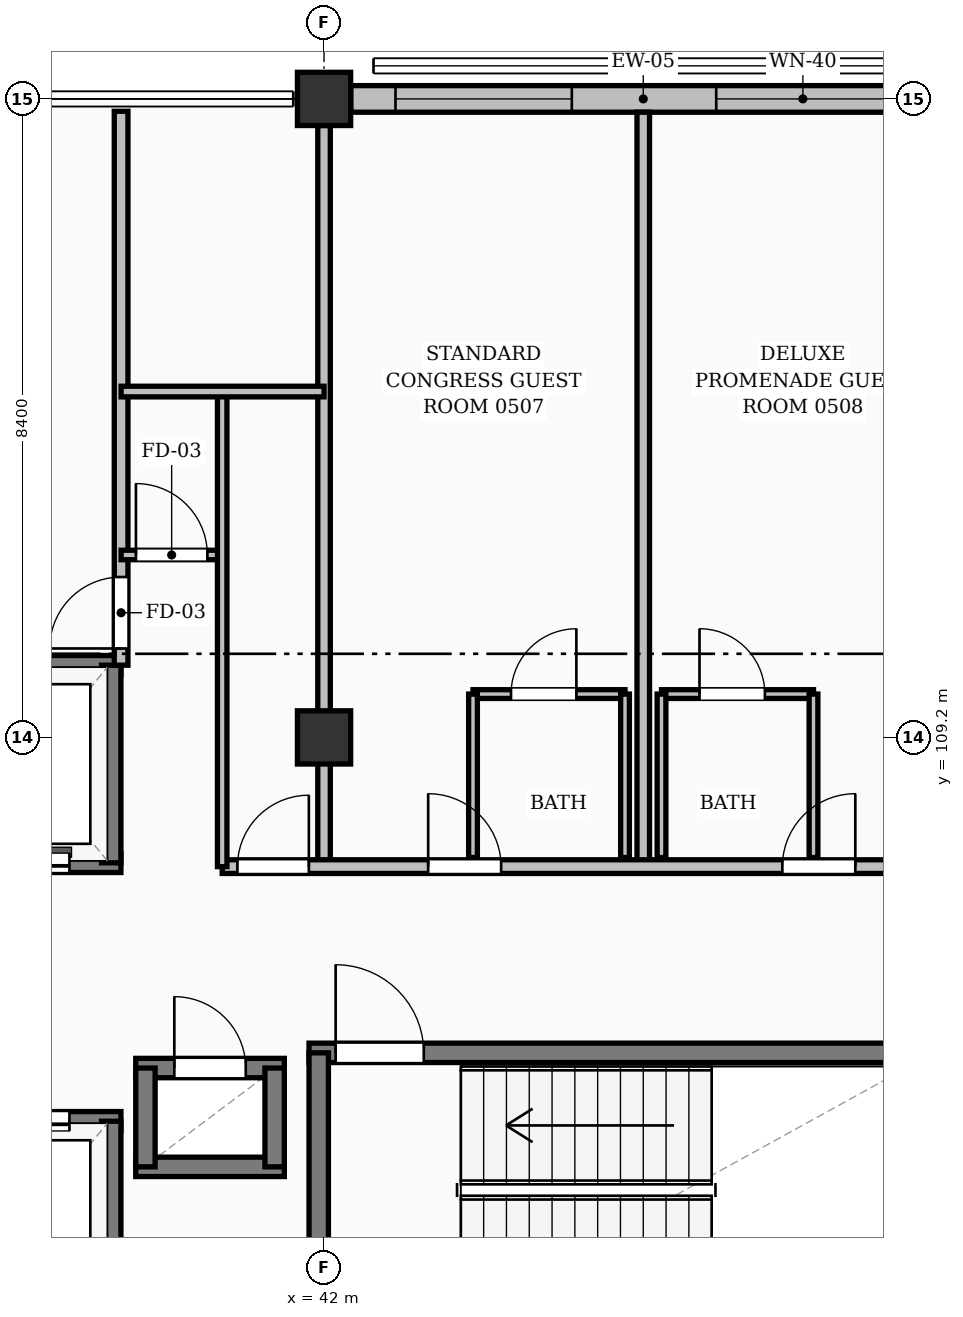
"""IFC4 building model, lengths in metres.
Left out: names, types, materials, properties, quantities, classifications, styles, units other than length and angle.
Written with IfcOpenShell. Run it as: python <this file> out.ifc"""

import sys

from ifc_helpers import new_model, si_unit, direction, frame, frame_2d, origin, origin_2d, place, context, subcontext, project, spatial, rectangle, extrude, element, fill, save


model = new_model("IFC4")
c1 = context("Model", 3, precision=1e-05, world=origin(), true_north=direction((0.0, 1.0)))
c2 = subcontext(c1, "Body", "Model", "MODEL_VIEW")
j1 = project(units=[si_unit("LENGTHUNIT", "METRE"), si_unit("PLANEANGLEUNIT", "RADIAN")], contexts=[c1])
p1 = place(None, origin())
s1 = spatial("IfcSite", under=j1, at=p1, CompositionType="ELEMENT")
p2 = place(p1, origin())
s2 = spatial("IfcBuilding", under=s1, at=p2, CompositionType="ELEMENT")
p3 = place(p2, frame((0.0, 0.0, 18.48)))
s3 = spatial("IfcBuildingStorey", under=s2, at=p3, CompositionType="ELEMENT", Elevation=18.48)
for number, where, z_axis, x_axis in (
    (1, (42.0, 109.2, 0.0), (0.0, 0.0, 1.0), (1.0, 0.0, 0.0)),
    (2, (42.0, 117.6, 0.0), (0.0, 0.0, 1.0), (1.0, 0.0, 0.0)),
):
    element("IfcColumn", number, at=place(p3, frame(where, z_axis=z_axis, x_axis=x_axis)), inside=s3, PredefinedType="COLUMN", context=c2, shape_type="SweptSolid", body=[
        extrude(rectangle(XDim=0.7, YDim=0.7, at=origin_2d()), origin(), (0.0, 0.0, 1.0), 3.36),
    ])
p4 = place(p3, frame((42.351, 117.6, 0.0), z_axis=(0.0, 0.0, 1.0), x_axis=(1.0, 0.0, 0.0)))
e3 = element("IfcWall", 3, at=p4, inside=s3, PredefinedType="SOLIDWALL", context=c2, shape_type="SweptSolid", body=[
    extrude(rectangle(XDim=7.698, YDim=0.35, at=frame_2d((3.849, 0.0))), origin(), (0.0, 0.0, 1.0), 2.494),
])
p5 = place(p4, frame((0.589, 0.0, 0.25)))
e4 = element("IfcOpeningElement", 4, at=p5, cuts=e3, PredefinedType="OPENING", context=c2, shape_type="SweptSolid", body=[
    extrude(rectangle(XDim=2.32, YDim=1.9, at=frame_2d((1.16, 0.95))), frame((0.0, 0.185, 0.0), z_axis=(0.0, -1.0, 0.0), x_axis=(1.0, 0.0, 0.0)), (0.0, 0.0, 1.0), 0.37),
])
p6 = place(p4, frame((4.809, 0.0, 0.25)))
e5 = element("IfcOpeningElement", 5, at=p6, cuts=e3, PredefinedType="OPENING", context=c2, shape_type="SweptSolid", body=[
    extrude(rectangle(XDim=2.28, YDim=2.0, at=frame_2d((1.14, 1.0))), frame((0.0, 0.185, 0.0), z_axis=(0.0, -1.0, 0.0), x_axis=(1.0, 0.0, 0.0)), (0.0, 0.0, 1.0), 0.37),
])
p7 = place(p3, frame((41.802, 105.05, 0.0), z_axis=(0.0, 0.0, 1.0), x_axis=(1.0, 0.0, 0.0)))
e6 = element("IfcWall", 6, at=p7, inside=s3, PredefinedType="SOLIDWALL", context=c2, shape_type="SweptSolid", body=[
    extrude(rectangle(XDim=8.225, YDim=0.255, at=frame_2d((4.113, 0.0))), origin(), (0.0, 0.0, 1.0), 3.12),
])
p8 = place(p7, frame((0.35, 0.0, 0.0)))
e7 = element("IfcOpeningElement", 7, at=p8, cuts=e6, PredefinedType="OPENING", context=c2, shape_type="SweptSolid", body=[
    extrude(rectangle(XDim=1.16, YDim=2.15, at=frame_2d((0.58, 1.075))), frame((0.0, 0.137, 0.0), z_axis=(0.0, -1.0, 0.0), x_axis=(1.0, 0.0, 0.0)), (0.0, 0.0, 1.0), 0.275),
])
p9 = place(p3, frame((41.93, 101.42, 0.0), z_axis=(0.0, 0.0, 1.0), x_axis=(0.0, 1.0, 0.0)))
e8 = element("IfcWall", 8, at=p9, inside=s3, PredefinedType="SOLIDWALL", context=c2, shape_type="SweptSolid", body=[
    extrude(rectangle(XDim=3.63, YDim=0.255, at=frame_2d((1.815, 0.0))), origin(), (0.0, 0.0, 1.0), 3.12),
])
p10 = place(p3, frame((36.873, 107.55, 0.0), z_axis=(0.0, 0.0, 1.0), x_axis=(1.0, 0.0, 0.0)))
e9 = element("IfcWall", 9, at=p10, inside=s3, PredefinedType="SOLIDWALL", context=c2, shape_type="SweptSolid", body=[
    extrude(rectangle(XDim=2.455, YDim=0.255, at=frame_2d((1.228, 0.0))), origin(), (0.0, 0.0, 1.0), 3.12),
])
p11 = place(p10, frame((0.677, 0.0, 0.0)))
e10 = element("IfcOpeningElement", 10, at=p11, cuts=e9, PredefinedType="OPENING", context=c2, shape_type="SweptSolid", body=[
    extrude(rectangle(XDim=1.1, YDim=2.15, at=frame_2d((0.55, 1.075))), frame((0.0, 0.137, 0.0), z_axis=(0.0, -1.0, 0.0), x_axis=(1.0, 0.0, 0.0)), (0.0, 0.0, 1.0), 0.275),
])
p12 = place(p3, frame((36.873, 110.15, 0.0), z_axis=(0.0, 0.0, 1.0), x_axis=(1.0, 0.0, 0.0)))
e11 = element("IfcWall", 11, at=p12, inside=s3, PredefinedType="SOLIDWALL", context=c2, shape_type="SweptSolid", body=[
    extrude(rectangle(XDim=2.455, YDim=0.255, at=frame_2d((1.228, 0.0))), origin(), (0.0, 0.0, 1.0), 3.12),
])
p13 = place(p3, frame((39.2, 107.55, 0.0), z_axis=(0.0, 0.0, 1.0), x_axis=(0.0, 1.0, 0.0)))
e12 = element("IfcWall", 12, at=p13, inside=s3, PredefinedType="SOLIDWALL", context=c2, shape_type="SweptSolid", body=[
    extrude(rectangle(XDim=2.6, YDim=0.255, at=frame_2d((1.3, 0.0))), origin(), (0.0, 0.0, 1.0), 3.12),
])
p14 = place(p3, frame((36.873, 104.15, 0.0), z_axis=(0.0, 0.0, 1.0), x_axis=(1.0, 0.0, 0.0)))
e13 = element("IfcWall", 13, at=p14, inside=s3, PredefinedType="SOLIDWALL", context=c2, shape_type="SweptSolid", body=[
    extrude(rectangle(XDim=2.455, YDim=0.255, at=frame_2d((1.228, 0.0))), origin(), (0.0, 0.0, 1.0), 3.12),
])
p15 = place(p14, frame((0.677, 0.0, 0.0)))
e14 = element("IfcOpeningElement", 14, at=p15, cuts=e13, PredefinedType="OPENING", context=c2, shape_type="SweptSolid", body=[
    extrude(rectangle(XDim=1.1, YDim=2.15, at=frame_2d((0.55, 1.075))), frame((0.0, 0.137, 0.0), z_axis=(0.0, -1.0, 0.0), x_axis=(1.0, 0.0, 0.0)), (0.0, 0.0, 1.0), 0.275),
])
p16 = place(p3, frame((39.2, 101.55, 0.0), z_axis=(0.0, 0.0, 1.0), x_axis=(0.0, 1.0, 0.0)))
e15 = element("IfcWall", 15, at=p16, inside=s3, PredefinedType="SOLIDWALL", context=c2, shape_type="SweptSolid", body=[
    extrude(rectangle(XDim=2.6, YDim=0.255, at=frame_2d((1.3, 0.0))), origin(), (0.0, 0.0, 1.0), 3.12),
])
p17 = place(p3, frame((39.522, 103.55, 0.0), z_axis=(0.0, 0.0, 1.0), x_axis=(1.0, 0.0, 0.0)))
e16 = element("IfcWall", 16, at=p17, inside=s3, PredefinedType="SOLIDWALL", context=c2, shape_type="SweptSolid", body=[
    extrude(rectangle(XDim=1.955, YDim=0.255, at=frame_2d((0.978, 0.0))), origin(), (0.0, 0.0, 1.0), 3.12),
])
p18 = place(p3, frame((39.522, 104.85, 0.0), z_axis=(0.0, 0.0, 1.0), x_axis=(1.0, 0.0, 0.0)))
e17 = element("IfcWall", 17, at=p18, inside=s3, PredefinedType="SOLIDWALL", context=c2, shape_type="SweptSolid", body=[
    extrude(rectangle(XDim=1.955, YDim=0.255, at=frame_2d((0.978, 0.0))), origin(), (0.0, 0.0, 1.0), 3.12),
])
p19 = place(p18, frame((0.508, 0.0, 0.0)))
e18 = element("IfcOpeningElement", 18, at=p19, cuts=e17, PredefinedType="OPENING", context=c2, shape_type="SweptSolid", body=[
    extrude(rectangle(XDim=0.94, YDim=2.1, at=frame_2d((0.47, 1.05))), frame((0.0, 0.137, 0.0), z_axis=(0.0, -1.0, 0.0), x_axis=(1.0, 0.0, 0.0)), (0.0, 0.0, 1.0), 0.275),
])
for number, where, z_axis, x_axis in (
    (19, (39.65, 103.55, 0.0), (0.0, 0.0, 1.0), (0.0, 1.0, 0.0)),
    (20, (41.35, 103.55, 0.0), (0.0, 0.0, 1.0), (0.0, 1.0, 0.0)),
):
    element("IfcWall", number, at=place(p3, frame(where, z_axis=z_axis, x_axis=x_axis)), inside=s3, PredefinedType="SOLIDWALL", context=c2, shape_type="SweptSolid", body=[
        extrude(rectangle(XDim=1.3, YDim=0.255, at=frame_2d((0.65, 0.0))), origin(), (0.0, 0.0, 1.0), 3.12),
    ])
p20 = place(p3, frame((43.96, 109.77, 0.0), z_axis=(0.0, 0.0, 1.0), x_axis=(1.0, 0.0, 0.0)))
e21 = element("IfcWall", 21, at=p20, inside=s3, PredefinedType="PARTITIONING", context=c2, shape_type="SweptSolid", body=[
    extrude(rectangle(XDim=2.0, YDim=0.115, at=frame_2d((1.0, 0.0))), origin(), (0.0, 0.0, 1.0), 3.12),
])
p21 = place(p20, frame((0.5, 0.0, 0.0)))
e22 = element("IfcOpeningElement", 22, at=p21, cuts=e21, PredefinedType="OPENING", context=c2, shape_type="SweptSolid", body=[
    extrude(rectangle(XDim=0.86, YDim=2.05, at=frame_2d((0.43, 1.025))), frame((0.0, 0.067, 0.0), z_axis=(0.0, -1.0, 0.0), x_axis=(1.0, 0.0, 0.0)), (0.0, 0.0, 1.0), 0.135),
])
p22 = place(p3, frame((43.96, 107.62, 0.0), z_axis=(0.0, 0.0, 1.0), x_axis=(0.0, 1.0, 0.0)))
e23 = element("IfcWall", 23, at=p22, inside=s3, PredefinedType="PARTITIONING", context=c2, shape_type="SweptSolid", body=[
    extrude(rectangle(XDim=2.15, YDim=0.115, at=frame_2d((1.075, 0.0))), origin(), (0.0, 0.0, 1.0), 2.642),
])
p23 = place(p3, frame((45.96, 107.62, 0.0), z_axis=(0.0, 0.0, 1.0), x_axis=(0.0, 1.0, 0.0)))
e24 = element("IfcWall", 24, at=p23, inside=s3, PredefinedType="PARTITIONING", context=c2, shape_type="SweptSolid", body=[
    extrude(rectangle(XDim=2.15, YDim=0.115, at=frame_2d((1.075, 0.0))), origin(), (0.0, 0.0, 1.0), 3.12),
])
p24 = place(p3, frame((46.44, 109.77, 0.0), z_axis=(0.0, 0.0, 1.0), x_axis=(1.0, 0.0, 0.0)))
e25 = element("IfcWall", 25, at=p24, inside=s3, PredefinedType="PARTITIONING", context=c2, shape_type="SweptSolid", body=[
    extrude(rectangle(XDim=2.0, YDim=0.115, at=frame_2d((1.0, 0.0))), origin(), (0.0, 0.0, 1.0), 3.12),
])
p25 = place(p24, frame((0.5, 0.0, 0.0)))
e26 = element("IfcOpeningElement", 26, at=p25, cuts=e25, PredefinedType="OPENING", context=c2, shape_type="SweptSolid", body=[
    extrude(rectangle(XDim=0.86, YDim=2.05, at=frame_2d((0.43, 1.025))), frame((0.0, 0.067, 0.0), z_axis=(0.0, -1.0, 0.0), x_axis=(1.0, 0.0, 0.0)), (0.0, 0.0, 1.0), 0.135),
])
p26 = place(p3, frame((46.44, 107.62, 0.0), z_axis=(0.0, 0.0, 1.0), x_axis=(0.0, 1.0, 0.0)))
e27 = element("IfcWall", 27, at=p26, inside=s3, PredefinedType="PARTITIONING", context=c2, shape_type="SweptSolid", body=[
    extrude(rectangle(XDim=2.15, YDim=0.115, at=frame_2d((1.075, 0.0))), origin(), (0.0, 0.0, 1.0), 3.12),
])
p27 = place(p3, frame((48.44, 107.62, 0.0), z_axis=(0.0, 0.0, 1.0), x_axis=(0.0, 1.0, 0.0)))
e28 = element("IfcWall", 28, at=p27, inside=s3, PredefinedType="PARTITIONING", context=c2, shape_type="SweptSolid", body=[
    extrude(rectangle(XDim=2.15, YDim=0.115, at=frame_2d((1.075, 0.0))), origin(), (0.0, 0.0, 1.0), 2.642),
])
p28 = place(p3, frame((46.2, 107.5, 0.0), z_axis=(0.0, 0.0, 1.0), x_axis=(0.0, 1.0, 0.0)))
e29 = element("IfcWall", 29, at=p28, inside=s3, PredefinedType="PARTITIONING", context=c2, shape_type="SweptSolid", body=[
    extrude(rectangle(XDim=9.925, YDim=0.165, at=frame_2d((4.962, 0.0))), origin(), (0.0, 0.0, 1.0), 3.12),
])
p29 = place(p3, frame((42.0, 107.5, 0.0), z_axis=(0.0, 0.0, 1.0), x_axis=(0.0, 1.0, 0.0)))
e30 = element("IfcWall", 30, at=p29, inside=s3, PredefinedType="PARTITIONING", context=c2, shape_type="SweptSolid", body=[
    extrude(rectangle(XDim=9.75, YDim=0.165, at=frame_2d((4.875, 0.0))), origin(), (0.0, 0.0, 1.0), 2.455),
])
p30 = place(p3, frame((40.66, 107.5, 0.0), z_axis=(0.0, 0.0, 1.0), x_axis=(1.0, 0.0, 0.0)))
e31 = element("IfcWall", 31, at=p30, inside=s3, PredefinedType="PARTITIONING", context=c2, shape_type="SweptSolid", body=[
    extrude(rectangle(XDim=43.21, YDim=0.18, at=frame_2d((21.605, 0.0))), origin(), (0.0, 0.0, 1.0), 3.12),
])
p31 = place(p30, frame((0.2, 0.0, 0.0)))
e32 = element("IfcOpeningElement", 32, at=p31, cuts=e31, PredefinedType="OPENING", context=c2, shape_type="SweptSolid", body=[
    extrude(rectangle(XDim=0.94, YDim=2.1, at=frame_2d((0.47, 1.05))), frame((0.0, 0.1, 0.0), z_axis=(0.0, -1.0, 0.0), x_axis=(1.0, 0.0, 0.0)), (0.0, 0.0, 1.0), 0.2),
])
p32 = place(p30, frame((2.71, 0.0, 0.0)))
e33 = element("IfcOpeningElement", 33, at=p32, cuts=e31, PredefinedType="OPENING", context=c2, shape_type="SweptSolid", body=[
    extrude(rectangle(XDim=0.96, YDim=2.15, at=frame_2d((0.48, 1.075))), frame((0.0, 0.1, 0.0), z_axis=(0.0, -1.0, 0.0), x_axis=(1.0, 0.0, 0.0)), (0.0, 0.0, 1.0), 0.2),
])
p33 = place(p30, frame((7.37, 0.0, 0.0)))
e34 = element("IfcOpeningElement", 34, at=p33, cuts=e31, PredefinedType="OPENING", context=c2, shape_type="SweptSolid", body=[
    extrude(rectangle(XDim=0.96, YDim=2.15, at=frame_2d((0.48, 1.075))), frame((0.0, 0.1, 0.0), z_axis=(0.0, -1.0, 0.0), x_axis=(1.0, 0.0, 0.0)), (0.0, 0.0, 1.0), 0.2),
])
p34 = place(p30, frame((11.11, 0.0, 0.0)))
e35 = element("IfcOpeningElement", 35, at=p34, cuts=e31, PredefinedType="OPENING", context=c2, shape_type="SweptSolid", body=[
    extrude(rectangle(XDim=0.96, YDim=2.15, at=frame_2d((0.48, 1.075))), frame((0.0, 0.1, 0.0), z_axis=(0.0, -1.0, 0.0), x_axis=(1.0, 0.0, 0.0)), (0.0, 0.0, 1.0), 0.2),
])
p35 = place(p30, frame((15.77, 0.0, 0.0)))
e36 = element("IfcOpeningElement", 36, at=p35, cuts=e31, PredefinedType="OPENING", context=c2, shape_type="SweptSolid", body=[
    extrude(rectangle(XDim=0.96, YDim=2.15, at=frame_2d((0.48, 1.075))), frame((0.0, 0.1, 0.0), z_axis=(0.0, -1.0, 0.0), x_axis=(1.0, 0.0, 0.0)), (0.0, 0.0, 1.0), 0.2),
])
p36 = place(p30, frame((19.51, 0.0, 0.0)))
e37 = element("IfcOpeningElement", 37, at=p36, cuts=e31, PredefinedType="OPENING", context=c2, shape_type="SweptSolid", body=[
    extrude(rectangle(XDim=0.96, YDim=2.15, at=frame_2d((0.48, 1.075))), frame((0.0, 0.1, 0.0), z_axis=(0.0, -1.0, 0.0), x_axis=(1.0, 0.0, 0.0)), (0.0, 0.0, 1.0), 0.2),
])
p37 = place(p30, frame((24.17, 0.0, 0.0)))
e38 = element("IfcOpeningElement", 38, at=p37, cuts=e31, PredefinedType="OPENING", context=c2, shape_type="SweptSolid", body=[
    extrude(rectangle(XDim=0.96, YDim=2.15, at=frame_2d((0.48, 1.075))), frame((0.0, 0.1, 0.0), z_axis=(0.0, -1.0, 0.0), x_axis=(1.0, 0.0, 0.0)), (0.0, 0.0, 1.0), 0.2),
])
p38 = place(p30, frame((27.91, 0.0, 0.0)))
e39 = element("IfcOpeningElement", 39, at=p38, cuts=e31, PredefinedType="OPENING", context=c2, shape_type="SweptSolid", body=[
    extrude(rectangle(XDim=0.96, YDim=2.15, at=frame_2d((0.48, 1.075))), frame((0.0, 0.1, 0.0), z_axis=(0.0, -1.0, 0.0), x_axis=(1.0, 0.0, 0.0)), (0.0, 0.0, 1.0), 0.2),
])
p39 = place(p30, frame((32.57, 0.0, 0.0)))
e40 = element("IfcOpeningElement", 40, at=p39, cuts=e31, PredefinedType="OPENING", context=c2, shape_type="SweptSolid", body=[
    extrude(rectangle(XDim=0.96, YDim=2.15, at=frame_2d((0.48, 1.075))), frame((0.0, 0.1, 0.0), z_axis=(0.0, -1.0, 0.0), x_axis=(1.0, 0.0, 0.0)), (0.0, 0.0, 1.0), 0.2),
])
p40 = place(p30, frame((36.44, 0.0, 0.0)))
e41 = element("IfcOpeningElement", 41, at=p40, cuts=e31, PredefinedType="OPENING", context=c2, shape_type="SweptSolid", body=[
    extrude(rectangle(XDim=1.02, YDim=2.15, at=frame_2d((0.51, 1.075))), frame((0.0, 0.1, 0.0), z_axis=(0.0, -1.0, 0.0), x_axis=(1.0, 0.0, 0.0)), (0.0, 0.0, 1.0), 0.2),
])
p41 = place(p3, frame((39.33, 110.15, 0.0), z_axis=(0.0, 0.0, 1.0), x_axis=(0.0, 1.0, 0.0)))
e42 = element("IfcWall", 42, at=p41, inside=s3, PredefinedType="PARTITIONING", context=c2, shape_type="SweptSolid", body=[
    extrude(rectangle(XDim=7.288, YDim=0.18, at=frame_2d((3.644, 0.0))), origin(), (0.0, 0.0, 1.0), 3.12),
])
p42 = place(p41, frame((0.22, 0.0, 0.0)))
e43 = element("IfcOpeningElement", 43, at=p42, cuts=e42, PredefinedType="OPENING", context=c2, shape_type="SweptSolid", body=[
    extrude(rectangle(XDim=0.94, YDim=2.1, at=frame_2d((0.47, 1.05))), frame((0.0, 0.1, 0.0), z_axis=(0.0, -1.0, 0.0), x_axis=(1.0, 0.0, 0.0)), (0.0, 0.0, 1.0), 0.2),
])
p43 = place(p3, frame((39.33, 111.6, 0.0), z_axis=(0.0, 0.0, 1.0), x_axis=(1.0, 0.0, 0.0)))
e44 = element("IfcWall", 44, at=p43, inside=s3, PredefinedType="PARTITIONING", context=c2, shape_type="SweptSolid", body=[
    extrude(rectangle(XDim=1.33, YDim=0.125, at=frame_2d((0.665, 0.0))), origin(), (0.0, 0.0, 1.0), 3.12),
])
p44 = place(p43, frame((0.195, 0.0, 0.0)))
e45 = element("IfcOpeningElement", 45, at=p44, cuts=e44, PredefinedType="OPENING", context=c2, shape_type="SweptSolid", body=[
    extrude(rectangle(XDim=0.94, YDim=2.1, at=frame_2d((0.47, 1.05))), frame((0.0, 0.073, 0.0), z_axis=(0.0, -1.0, 0.0), x_axis=(1.0, 0.0, 0.0)), (0.0, 0.0, 1.0), 0.145),
])
p45 = place(p3, frame((40.66, 107.5, 0.0), z_axis=(0.0, 0.0, 1.0), x_axis=(0.0, 1.0, 0.0)))
e46 = element("IfcWall", 46, at=p45, inside=s3, PredefinedType="PARTITIONING", context=c2, shape_type="SweptSolid", body=[
    extrude(rectangle(XDim=6.25, YDim=0.125, at=frame_2d((3.125, 0.0))), origin(), (0.0, 0.0, 1.0), 3.12),
])
p46 = place(p3, frame((39.33, 113.75, 0.0), z_axis=(0.0, 0.0, 1.0), x_axis=(1.0, 0.0, 0.0)))
e47 = element("IfcWall", 47, at=p46, inside=s3, PredefinedType="PARTITIONING", context=c2, shape_type="SweptSolid", body=[
    extrude(rectangle(XDim=2.67, YDim=0.14, at=frame_2d((1.335, 0.0))), origin(), (0.0, 0.0, 1.0), 3.12),
])
p47 = place(p5, origin())
e48 = element("IfcWindow", 48, at=p47, inside=s3, PartitioningType="DOUBLE_PANEL_VERTICAL", PredefinedType="WINDOW", context=c2, shape_type="SweptSolid", body=[
    extrude(rectangle(XDim=2.32, YDim=1.9, at=frame_2d((1.16, 0.95))), frame((0.0, 0.03, 0.0), z_axis=(0.0, -1.0, 0.0), x_axis=(1.0, 0.0, 0.0)), (0.0, 0.0, 1.0), 0.06),
])
fill(e4, e48)
p48 = place(p6, origin())
e49 = element("IfcWindow", 49, at=p48, inside=s3, PartitioningType="DOUBLE_PANEL_VERTICAL", PredefinedType="WINDOW", context=c2, shape_type="SweptSolid", body=[
    extrude(rectangle(XDim=2.28, YDim=2.0, at=frame_2d((1.14, 1.0))), frame((0.0, 0.03, 0.0), z_axis=(0.0, -1.0, 0.0), x_axis=(1.0, 0.0, 0.0)), (0.0, 0.0, 1.0), 0.06),
])
fill(e5, e49)
p49 = place(p8, origin())
e50 = element("IfcDoor", 50, at=p49, inside=s3, OperationType="SINGLE_SWING_LEFT", PredefinedType="DOOR", context=c2, shape_type="SweptSolid", body=[
    extrude(rectangle(XDim=1.16, YDim=2.15, at=frame_2d((0.58, 1.075))), frame((0.0, 0.025, 0.0), z_axis=(0.0, -1.0, 0.0), x_axis=(1.0, 0.0, 0.0)), (0.0, 0.0, 1.0), 0.05),
])
fill(e7, e50)
p50 = place(p11, origin())
e51 = element("IfcDoor", 51, at=p50, inside=s3, OperationType="DOUBLE_DOOR_SLIDING", PredefinedType="DOOR", context=c2, shape_type="SweptSolid", body=[
    extrude(rectangle(XDim=1.1, YDim=2.15, at=frame_2d((0.55, 1.075))), frame((0.0, 0.025, 0.0), z_axis=(0.0, -1.0, 0.0), x_axis=(1.0, 0.0, 0.0)), (0.0, 0.0, 1.0), 0.05),
])
fill(e10, e51)
p51 = place(p15, origin())
e52 = element("IfcDoor", 52, at=p51, inside=s3, OperationType="DOUBLE_DOOR_SLIDING", PredefinedType="DOOR", context=c2, shape_type="SweptSolid", body=[
    extrude(rectangle(XDim=1.1, YDim=2.15, at=frame_2d((0.55, 1.075))), frame((0.0, 0.025, 0.0), z_axis=(0.0, -1.0, 0.0), x_axis=(1.0, 0.0, 0.0)), (0.0, 0.0, 1.0), 0.05),
])
fill(e14, e52)
p52 = place(p19, origin())
e53 = element("IfcDoor", 53, at=p52, inside=s3, OperationType="SINGLE_SWING_LEFT", PredefinedType="DOOR", context=c2, shape_type="SweptSolid", body=[
    extrude(rectangle(XDim=0.94, YDim=2.1, at=frame_2d((0.47, 1.05))), frame((0.0, 0.025, 0.0), z_axis=(0.0, -1.0, 0.0), x_axis=(1.0, 0.0, 0.0)), (0.0, 0.0, 1.0), 0.05),
])
fill(e18, e53)
p53 = place(p21, origin())
e54 = element("IfcDoor", 54, at=p53, inside=s3, OperationType="SINGLE_SWING_RIGHT", PredefinedType="DOOR", context=c2, shape_type="SweptSolid", body=[
    extrude(rectangle(XDim=0.86, YDim=2.05, at=frame_2d((0.43, 1.025))), frame((0.0, 0.025, 0.0), z_axis=(0.0, -1.0, 0.0), x_axis=(1.0, 0.0, 0.0)), (0.0, 0.0, 1.0), 0.05),
])
fill(e22, e54)
p54 = place(p25, origin())
e55 = element("IfcDoor", 55, at=p54, inside=s3, OperationType="SINGLE_SWING_LEFT", PredefinedType="DOOR", context=c2, shape_type="SweptSolid", body=[
    extrude(rectangle(XDim=0.86, YDim=2.05, at=frame_2d((0.43, 1.025))), frame((0.0, 0.025, 0.0), z_axis=(0.0, -1.0, 0.0), x_axis=(1.0, 0.0, 0.0)), (0.0, 0.0, 1.0), 0.05),
])
fill(e26, e55)
p55 = place(p31, origin())
e56 = element("IfcDoor", 56, at=p55, inside=s3, OperationType="SINGLE_SWING_RIGHT", PredefinedType="DOOR", context=c2, shape_type="SweptSolid", body=[
    extrude(rectangle(XDim=0.94, YDim=2.1, at=frame_2d((0.47, 1.05))), frame((0.0, 0.025, 0.0), z_axis=(0.0, -1.0, 0.0), x_axis=(1.0, 0.0, 0.0)), (0.0, 0.0, 1.0), 0.05),
])
fill(e32, e56)
p56 = place(p32, origin())
e57 = element("IfcDoor", 57, at=p56, inside=s3, OperationType="SINGLE_SWING_LEFT", PredefinedType="DOOR", context=c2, shape_type="SweptSolid", body=[
    extrude(rectangle(XDim=0.96, YDim=2.15, at=frame_2d((0.48, 1.075))), frame((0.0, 0.025, 0.0), z_axis=(0.0, -1.0, 0.0), x_axis=(1.0, 0.0, 0.0)), (0.0, 0.0, 1.0), 0.05),
])
fill(e33, e57)
p57 = place(p33, origin())
e58 = element("IfcDoor", 58, at=p57, inside=s3, OperationType="SINGLE_SWING_RIGHT", PredefinedType="DOOR", context=c2, shape_type="SweptSolid", body=[
    extrude(rectangle(XDim=0.96, YDim=2.15, at=frame_2d((0.48, 1.075))), frame((0.0, 0.025, 0.0), z_axis=(0.0, -1.0, 0.0), x_axis=(1.0, 0.0, 0.0)), (0.0, 0.0, 1.0), 0.05),
])
fill(e34, e58)
p58 = place(p42, origin())
e59 = element("IfcDoor", 59, at=p58, inside=s3, OperationType="SINGLE_SWING_LEFT", PredefinedType="DOOR", context=c2, shape_type="SweptSolid", body=[
    extrude(rectangle(XDim=0.94, YDim=2.1, at=frame_2d((0.47, 1.05))), frame((0.0, 0.025, 0.0), z_axis=(0.0, -1.0, 0.0), x_axis=(1.0, 0.0, 0.0)), (0.0, 0.0, 1.0), 0.05),
])
fill(e43, e59)
p59 = place(p44, origin())
e60 = element("IfcDoor", 60, at=p59, inside=s3, OperationType="SINGLE_SWING_LEFT", PredefinedType="DOOR", context=c2, shape_type="SweptSolid", body=[
    extrude(rectangle(XDim=0.94, YDim=2.1, at=frame_2d((0.47, 1.05))), frame((0.0, 0.025, 0.0), z_axis=(0.0, -1.0, 0.0), x_axis=(1.0, 0.0, 0.0)), (0.0, 0.0, 1.0), 0.05),
])
fill(e45, e60)
save(model, sys.argv[1])
